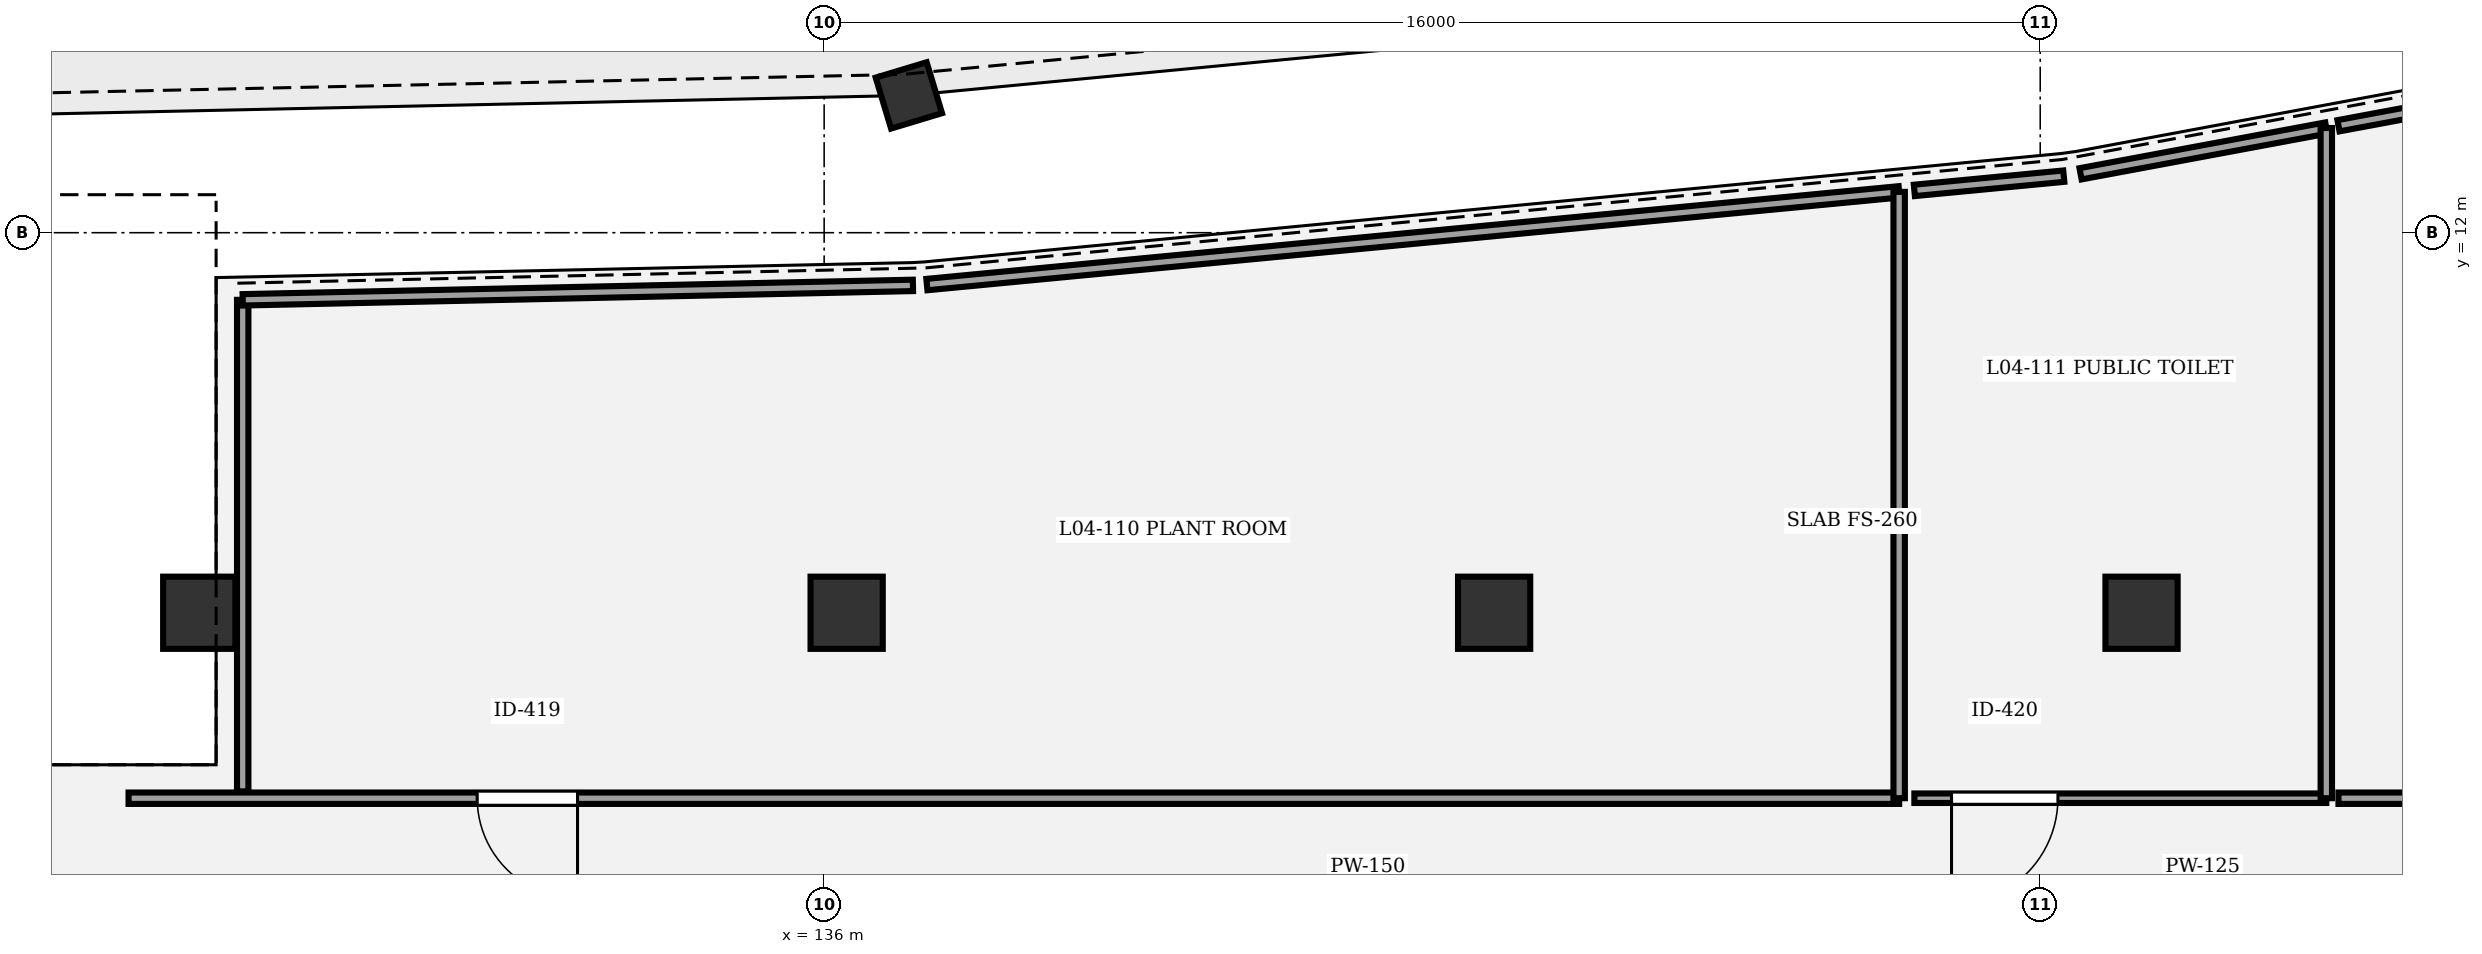
"""IFC4 building model, lengths in metres.
Left out: names, types, materials, properties, quantities, classifications, styles, units other than length and angle.
Written with IfcOpenShell. Run it as: python <this file> out.ifc"""

import sys

from ifc_helpers import new_model, si_unit, direction, frame, frame_2d, origin, origin_2d, place, context, subcontext, project, spatial, rectangle, circle, extrude, element, fill, save


model = new_model("IFC4")
c1 = context("Model", 3, precision=1e-05, world=origin(), true_north=direction((0.0, 1.0)))
c2 = subcontext(c1, "Body", "Model", "MODEL_VIEW")
j1 = project(units=[si_unit("LENGTHUNIT", "METRE"), si_unit("PLANEANGLEUNIT", "RADIAN")], contexts=[c1])
p1 = place(None, origin())
s1 = spatial("IfcSite", under=j1, at=p1, CompositionType="ELEMENT")
p2 = place(p1, origin())
s2 = spatial("IfcBuilding", under=s1, at=p2, CompositionType="ELEMENT")
p3 = place(p2, frame((0.0, 0.0, 19.2)))
s3 = spatial("IfcBuildingStorey", under=s2, at=p3, CompositionType="ELEMENT", Elevation=19.2)
p4 = place(p3, frame((137.115, 13.806, 0.0), z_axis=(0.0, 0.0, 1.0), x_axis=(0.289198876314, -0.957269037387, 0.0)))
e1 = element("IfcColumn", 1, at=p4, inside=s3, PredefinedType="COLUMN", context=c2, shape_type="SweptSolid", body=[
    extrude(rectangle(XDim=0.7, YDim=0.7, at=origin_2d()), origin(), (0.0, 0.0, 1.0), 4.8),
])
for number, where, z_axis, x_axis in (
    (2, (127.778, 7.0, 0.0), (0.0, 0.0, 1.0), (1.0, 0.0, 0.0)),
    (3, (136.296, 7.0, 0.0), (0.0, 0.0, 1.0), (1.0, 0.0, 0.0)),
    (4, (144.815, 7.0, 0.0), (0.0, 0.0, 1.0), (1.0, 0.0, 0.0)),
    (5, (153.333, 7.0, 0.0), (0.0, 0.0, 1.0), (1.0, 0.0, 0.0)),
):
    element("IfcColumn", number, at=place(p3, frame(where, z_axis=z_axis, x_axis=x_axis)), inside=s3, PredefinedType="COLUMN", context=c2, shape_type="SweptSolid", body=[
        extrude(circle(Radius=0.475, at=origin_2d()), origin(), (0.0, 0.0, 1.0), 4.8),
    ])
p5 = place(p3, frame((150.144, 4.56, 0.0), z_axis=(0.0, 0.0, 1.0), x_axis=(-1.0, 0.0, 0.0)))
e6 = element("IfcWall", 6, at=p5, inside=s3, PredefinedType="PARTITIONING", context=c2, shape_type="SweptSolid", body=[
    extrude(rectangle(XDim=23.296, YDim=0.15, at=frame_2d((11.648, 0.0))), origin(), (0.0, 0.0, 1.0), 3.55),
])
p6 = place(p5, frame((17.389, 0.0, 0.0)))
e7 = element("IfcOpeningElement", 7, at=p6, cuts=e6, PredefinedType="OPENING", context=c2, shape_type="SweptSolid", body=[
    extrude(rectangle(XDim=1.32, YDim=2.2, at=frame_2d((0.66, 1.1))), frame((0.0, 0.085, 0.0), z_axis=(0.0, -1.0, 0.0), x_axis=(1.0, 0.0, 0.0)), (0.0, 0.0, 1.0), 0.17),
])
p7 = place(p3, frame((155.764, 4.56, 0.0), z_axis=(0.0, 0.0, 1.0), x_axis=(-1.0, 0.0, 0.0)))
e8 = element("IfcWall", 8, at=p7, inside=s3, PredefinedType="PARTITIONING", context=c2, shape_type="SweptSolid", body=[
    extrude(rectangle(XDim=5.42, YDim=0.125, at=frame_2d((2.71, 0.0))), origin(), (0.0, 0.0, 1.0), 3.55),
])
p8 = place(p7, frame((3.531, 0.0, 0.0)))
e9 = element("IfcOpeningElement", 9, at=p8, cuts=e8, PredefinedType="OPENING", context=c2, shape_type="SweptSolid", body=[
    extrude(rectangle(XDim=1.4, YDim=2.2, at=frame_2d((0.7, 1.1))), frame((0.0, 0.073, 0.0), z_axis=(0.0, -1.0, 0.0), x_axis=(1.0, 0.0, 0.0)), (0.0, 0.0, 1.0), 0.145),
])
p9 = place(p3, frame((173.64, 4.56, 0.0), z_axis=(0.0, 0.0, 1.0), x_axis=(-1.0, 0.0, 0.0)))
e10 = element("IfcWall", 10, at=p9, inside=s3, PredefinedType="PARTITIONING", context=c2, shape_type="SweptSolid", body=[
    extrude(rectangle(XDim=17.716, YDim=0.15, at=frame_2d((8.858, 0.0))), origin(), (0.0, 0.0, 1.0), 3.55),
])
p10 = place(p9, frame((15.687, 0.0, 0.0)))
e11 = element("IfcOpeningElement", 11, at=p10, cuts=e10, PredefinedType="OPENING", context=c2, shape_type="SweptSolid", body=[
    extrude(rectangle(XDim=0.9, YDim=2.3, at=frame_2d((0.45, 1.15))), frame((0.0, 0.085, 0.0), z_axis=(0.0, -1.0, 0.0), x_axis=(1.0, 0.0, 0.0)), (0.0, 0.0, 1.0), 0.17),
])
p11 = place(p3, frame((128.35, 4.65, 0.0), z_axis=(0.0, 0.0, 1.0), x_axis=(0.0, 1.0, 0.0)))
e12 = element("IfcWall", 12, at=p11, inside=s3, PredefinedType="PARTITIONING", context=c2, shape_type="SweptSolid", body=[
    extrude(rectangle(XDim=6.467, YDim=0.15, at=frame_2d((3.233, 0.0))), origin(), (0.0, 0.0, 1.0), 3.55),
])
p12 = place(p3, frame((128.35, 11.117, 0.0), z_axis=(0.0, 0.0, 1.0), x_axis=(0.999768109674, 0.021534318641, 0.0)))
e13 = element("IfcWall", 13, at=p12, inside=s3, PredefinedType="PARTITIONING", context=c2, shape_type="SweptSolid", body=[
    extrude(rectangle(XDim=8.82, YDim=0.15, at=frame_2d((4.41, 0.0))), origin(), (0.0, 0.0, 1.0), 3.55),
])
p13 = place(p3, frame((137.352, 11.317, 0.0), z_axis=(0.0, 0.0, 1.0), x_axis=(0.995483253835, 0.094937302124, 0.0)))
e14 = element("IfcWall", 14, at=p13, inside=s3, PredefinedType="PARTITIONING", context=c2, shape_type="SweptSolid", body=[
    extrude(rectangle(XDim=12.85, YDim=0.15, at=frame_2d((6.425, 0.0))), origin(), (0.0, 0.0, 1.0), 3.55),
])
p14 = place(p3, frame((150.144, 12.537, 0.0), z_axis=(0.0, 0.0, 1.0), x_axis=(0.0, -1.0, 0.0)))
e15 = element("IfcWall", 15, at=p14, inside=s3, PredefinedType="PARTITIONING", context=c2, shape_type="SweptSolid", body=[
    extrude(rectangle(XDim=7.977, YDim=0.15, at=frame_2d((3.989, 0.0))), origin(), (0.0, 0.0, 1.0), 3.55),
])
p15 = place(p3, frame((152.531, 12.775, 0.0), z_axis=(0.0, 0.0, 1.0), x_axis=(0.983089981796, 0.18312314898, 0.0)))
e16 = element("IfcWall", 16, at=p15, inside=s3, PredefinedType="PARTITIONING", context=c2, shape_type="SweptSolid", body=[
    extrude(rectangle(XDim=3.289, YDim=0.15, at=frame_2d((1.645, 0.0))), origin(), (0.0, 0.0, 1.0), 3.55),
])
p16 = place(p3, frame((155.764, 13.377, 0.0), z_axis=(0.0, 0.0, 1.0), x_axis=(0.0, -1.0, 0.0)))
e17 = element("IfcWall", 17, at=p16, inside=s3, PredefinedType="PARTITIONING", context=c2, shape_type="SweptSolid", body=[
    extrude(rectangle(XDim=8.817, YDim=0.15, at=frame_2d((4.409, 0.0))), origin(), (0.0, 0.0, 1.0), 3.55),
])
p17 = place(p3, frame((150.344, 12.556, 0.0), z_axis=(0.0, 0.0, 1.0), x_axis=(0.995483241572, 0.094937430712, 0.0)))
e18 = element("IfcWall", 18, at=p17, inside=s3, PredefinedType="PARTITIONING", context=c2, shape_type="SweptSolid", body=[
    extrude(rectangle(XDim=1.975, YDim=0.15, at=frame_2d((0.988, 0.0))), origin(), (0.0, 0.0, 1.0), 3.55),
])
p18 = place(p3, frame((155.924, 13.407, 0.0), z_axis=(0.0, 0.0, 1.0), x_axis=(0.983095301178, 0.183094589766, 0.0)))
e19 = element("IfcWall", 19, at=p18, inside=s3, PredefinedType="PARTITIONING", context=c2, shape_type="SweptSolid", body=[
    extrude(rectangle(XDim=9.495, YDim=0.15, at=frame_2d((4.748, 0.0))), origin(), (0.0, 0.0, 1.0), 3.55),
])
p19 = place(p6, origin())
e20 = element("IfcDoor", 20, at=p19, inside=s3, OperationType="SINGLE_SWING_LEFT", PredefinedType="DOOR", context=c2, shape_type="SweptSolid", body=[
    extrude(rectangle(XDim=1.32, YDim=2.2, at=frame_2d((0.66, 1.1))), frame((0.0, 0.025, 0.0), z_axis=(0.0, -1.0, 0.0), x_axis=(1.0, 0.0, 0.0)), (0.0, 0.0, 1.0), 0.05),
])
fill(e7, e20)
p20 = place(p8, origin())
e21 = element("IfcDoor", 21, at=p20, inside=s3, OperationType="SINGLE_SWING_RIGHT", PredefinedType="DOOR", context=c2, shape_type="SweptSolid", body=[
    extrude(rectangle(XDim=1.4, YDim=2.2, at=frame_2d((0.7, 1.1))), frame((0.0, 0.025, 0.0), z_axis=(0.0, -1.0, 0.0), x_axis=(1.0, 0.0, 0.0)), (0.0, 0.0, 1.0), 0.05),
])
fill(e9, e21)
save(model, sys.argv[1])
